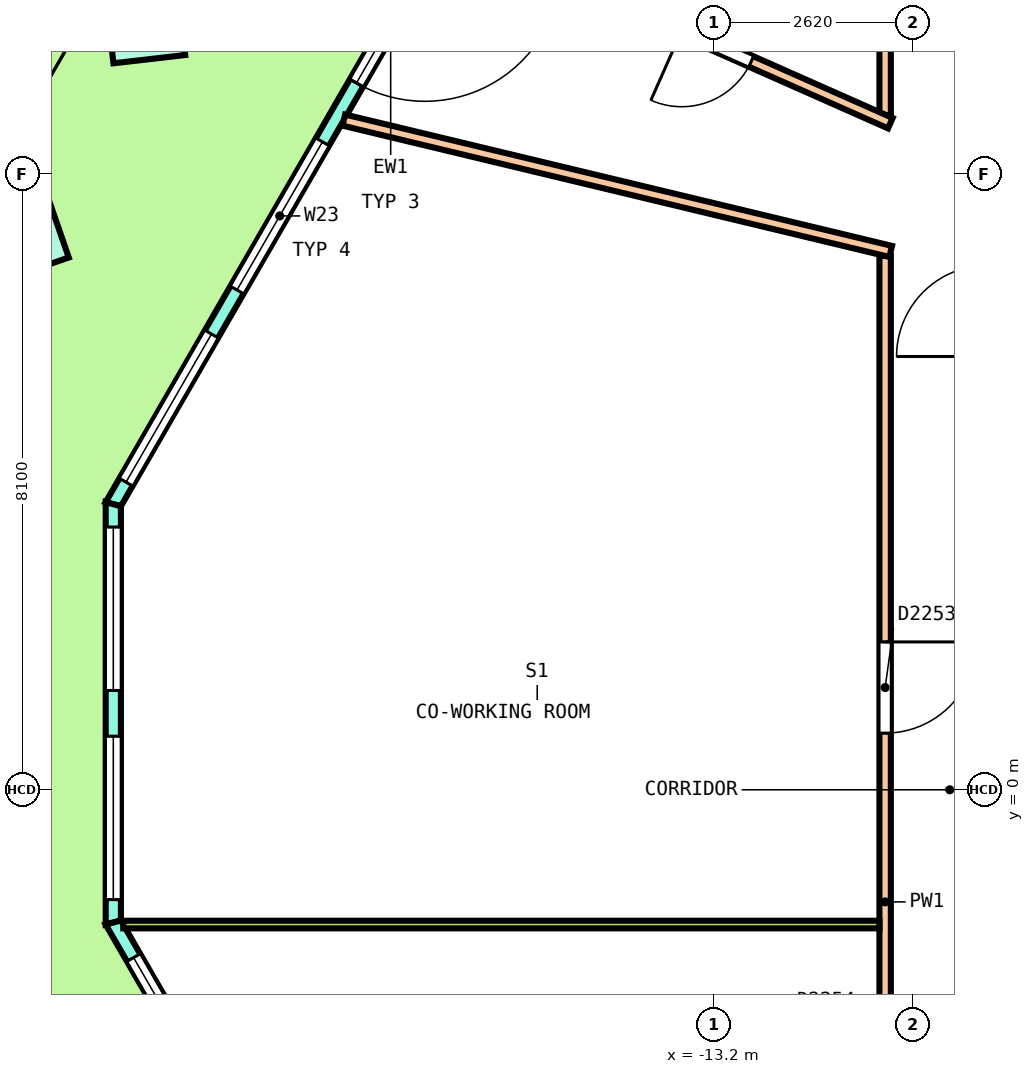
"""IFC4 building model, lengths in metres.
Left out: names, types, materials, properties, quantities, classifications, styles, units other than length and angle.
Written with IfcOpenShell. Run it as: python <this file> out.ifc"""

import sys

from ifc_helpers import new_model, si_unit, direction, frame, frame_2d, origin, origin_2d, place, context, subcontext, project, spatial, polyline, rectangle, outline, extrude, element, fill, save


model = new_model("IFC4")
c1 = context("Model", 3, precision=1e-05, world=origin(), true_north=direction((0.0, 1.0)))
c2 = subcontext(c1, "Body", "Model", "MODEL_VIEW")
j1 = project(units=[si_unit("LENGTHUNIT", "METRE"), si_unit("PLANEANGLEUNIT", "RADIAN")], contexts=[c1])
p1 = place(None, origin())
s1 = spatial("IfcSite", under=j1, at=p1, CompositionType="ELEMENT")
p2 = place(p1, origin())
s2 = spatial("IfcBuilding", under=s1, at=p2, CompositionType="ELEMENT")
p3 = place(p2, frame((0.0, 0.0, 295.0)))
s3 = spatial("IfcBuildingStorey", under=s2, at=p3, CompositionType="ELEMENT", Elevation=295.0)
p4 = place(p3, frame((-20.685, 10.084, 0.0), z_axis=(-0.025408167311, 0.018838245421, 0.999499647595), x_axis=(-0.499703712508, -0.866188822081, 0.003622734722)))
e1 = element("IfcColumn", 1, at=p4, inside=s3, PredefinedType="COLUMN", context=c2, shape_type="SweptSolid", body=[
    extrude(rectangle(XDim=0.95, YDim=0.95, at=origin_2d()), origin(), (0.0, 0.0, 1.0), 3.642),
])
p5 = place(p3, frame((-22.295, 7.296, 0.0), z_axis=(-0.021786848517, 0.025138671366, 0.999446537056), x_axis=(-0.499840745781, -0.866048897927, 0.010887389788)))
e2 = element("IfcColumn", 2, at=p5, inside=s3, PredefinedType="COLUMN", context=c2, shape_type="SweptSolid", body=[
    extrude(rectangle(XDim=0.95, YDim=0.95, at=origin_2d()), origin(), (0.0, 0.0, 1.0), 3.642),
])
p6 = place(p3, frame((-13.806, 16.398, 0.0), z_axis=(0.0, 0.0, 1.0), x_axis=(-0.500006712695, -0.866021528173, 0.0)))
e3 = element("IfcWall", 3, at=p6, inside=s3, PredefinedType="SOLIDWALL", context=c2, shape_type="SweptSolid", body=[
    extrude(outline(polyline([(-0.027, -0.1), (1.02, -0.1), (2.066, -0.1), (3.113, -0.1), (4.159, -0.1), (5.205, -0.1), (6.252, -0.1), (7.298, -0.1), (8.345, -0.1), (9.391, -0.1), (10.438, -0.1), (11.484, -0.1), (12.531, -0.1), (13.577, -0.1), (14.623, -0.1), (14.57, 0.1), (13.531, 0.1), (12.492, 0.1), (11.453, 0.1), (10.415, 0.1), (9.376, 0.1), (8.337, 0.1), (7.298, 0.1), (6.26, 0.1), (5.221, 0.1), (4.182, 0.1), (3.143, 0.1), (2.104, 0.1), (1.066, 0.1), (0.027, 0.1), (-0.027, -0.1)])), origin(), (0.0, 0.0, 1.0), 3.7),
])
p7 = place(p6, frame((0.335, 0.0, 0.1)))
e4 = element("IfcOpeningElement", 4, at=p7, cuts=e3, PredefinedType="OPENING", context=c2, shape_type="SweptSolid", body=[
    extrude(rectangle(XDim=2.25, YDim=2.75, at=frame_2d((1.125, 1.375))), frame((0.0, 0.11, 0.0), z_axis=(0.0, -1.0, 0.0), x_axis=(1.0, 0.0, 0.0)), (0.0, 0.0, 1.0), 0.22),
])
p8 = place(p6, frame((3.254, 0.0, 0.1)))
e5 = element("IfcOpeningElement", 5, at=p8, cuts=e3, PredefinedType="OPENING", context=c2, shape_type="SweptSolid", body=[
    extrude(rectangle(XDim=2.25, YDim=2.75, at=frame_2d((1.125, 1.375))), frame((0.0, 0.11, 0.0), z_axis=(0.0, -1.0, 0.0), x_axis=(1.0, 0.0, 0.0)), (0.0, 0.0, 1.0), 0.22),
])
p9 = place(p6, frame((6.398, 0.0, 0.0)))
e6 = element("IfcOpeningElement", 6, at=p9, cuts=e3, PredefinedType="OPENING", context=c2, shape_type="SweptSolid", body=[
    extrude(rectangle(XDim=1.8, YDim=2.4, at=frame_2d((0.9, 1.2))), frame((0.0, 0.11, 0.0), z_axis=(0.0, -1.0, 0.0), x_axis=(1.0, 0.0, 0.0)), (0.0, 0.0, 1.0), 0.22),
])
p10 = place(p6, frame((6.398, 0.0, 2.55)))
e7 = element("IfcOpeningElement", 7, at=p10, cuts=e3, PredefinedType="OPENING", context=c2, shape_type="SweptSolid", body=[
    extrude(rectangle(XDim=1.8, YDim=0.3, at=frame_2d((0.9, 0.15))), frame((0.0, 0.11, 0.0), z_axis=(0.0, -1.0, 0.0), x_axis=(1.0, 0.0, 0.0)), (0.0, 0.0, 1.0), 0.22),
])
p11 = place(p6, frame((9.093, 0.0, 0.1)))
e8 = element("IfcOpeningElement", 8, at=p11, cuts=e3, PredefinedType="OPENING", context=c2, shape_type="SweptSolid", body=[
    extrude(rectangle(XDim=2.25, YDim=2.75, at=frame_2d((1.125, 1.375))), frame((0.0, 0.11, 0.0), z_axis=(0.0, -1.0, 0.0), x_axis=(1.0, 0.0, 0.0)), (0.0, 0.0, 1.0), 0.22),
])
p12 = place(p6, frame((12.012, 0.0, 0.1)))
e9 = element("IfcOpeningElement", 9, at=p12, cuts=e3, PredefinedType="OPENING", context=c2, shape_type="SweptSolid", body=[
    extrude(rectangle(XDim=2.25, YDim=2.75, at=frame_2d((1.125, 1.375))), frame((0.0, 0.11, 0.0), z_axis=(0.0, -1.0, 0.0), x_axis=(1.0, 0.0, 0.0)), (0.0, 0.0, 1.0), 0.22),
])
p13 = place(p3, frame((-21.104, 3.757, 0.0), z_axis=(0.0, 0.0, 1.0), x_axis=(0.0, -1.0, 0.0)))
e10 = element("IfcWall", 10, at=p13, inside=s3, PredefinedType="SOLIDWALL", context=c2, shape_type="SweptSolid", body=[
    extrude(outline(polyline([(-0.027, -0.1), (1.084, -0.1), (2.196, -0.1), (3.307, -0.1), (4.419, -0.1), (5.53, -0.1), (5.477, 0.1), (4.387, 0.1), (3.297, 0.1), (2.207, 0.1), (1.117, 0.1), (0.027, 0.1), (-0.027, -0.1)])), origin(), (0.0, 0.0, 1.0), 3.7),
])
p14 = place(p13, frame((0.301, 0.0, 0.1)))
e11 = element("IfcOpeningElement", 11, at=p14, cuts=e10, PredefinedType="OPENING", context=c2, shape_type="SweptSolid", body=[
    extrude(rectangle(XDim=2.15, YDim=2.75, at=frame_2d((1.075, 1.375))), frame((0.0, 0.11, 0.0), z_axis=(0.0, -1.0, 0.0), x_axis=(1.0, 0.0, 0.0)), (0.0, 0.0, 1.0), 0.22),
])
p15 = place(p13, frame((3.052, 0.0, 0.1)))
e12 = element("IfcOpeningElement", 12, at=p15, cuts=e10, PredefinedType="OPENING", context=c2, shape_type="SweptSolid", body=[
    extrude(rectangle(XDim=2.15, YDim=2.75, at=frame_2d((1.075, 1.375))), frame((0.0, 0.11, 0.0), z_axis=(0.0, -1.0, 0.0), x_axis=(1.0, 0.0, 0.0)), (0.0, 0.0, 1.0), 0.22),
])
p16 = place(p3, frame((-21.104, -1.746, 0.0), z_axis=(0.0, 0.0, 1.0), x_axis=(0.500012333517, -0.866018282908, 0.0)))
e13 = element("IfcWall", 13, at=p16, inside=s3, PredefinedType="SOLIDWALL", context=c2, shape_type="SweptSolid", body=[
    extrude(outline(polyline([(-0.027, -0.1), (0.98, -0.1), (1.988, -0.1), (2.995, -0.1), (4.003, -0.1), (5.01, -0.1), (6.018, -0.1), (7.025, -0.1), (8.033, -0.1), (9.04, -0.1), (10.047, -0.1), (11.055, -0.1), (12.062, -0.1), (13.07, -0.1), (14.077, -0.1), (15.085, -0.1), (16.092, -0.1), (17.1, -0.1), (18.107, -0.1), (18.053, 0.1), (17.052, 0.1), (16.05, 0.1), (15.049, 0.1), (14.047, 0.1), (13.046, 0.1), (12.044, 0.1), (11.043, 0.1), (10.042, 0.1), (9.04, 0.1), (8.039, 0.1), (7.037, 0.1), (6.036, 0.1), (5.034, 0.1), (4.033, 0.1), (3.031, 0.1), (2.03, 0.1), (1.028, 0.1), (0.027, 0.1), (-0.027, -0.1)])), origin(), (0.0, 0.0, 1.0), 3.7),
])
p17 = place(p16, frame((0.533, 0.0, 0.1)))
e14 = element("IfcOpeningElement", 14, at=p17, cuts=e13, PredefinedType="OPENING", context=c2, shape_type="SweptSolid", body=[
    extrude(rectangle(XDim=2.55, YDim=2.75, at=frame_2d((1.275, 1.375))), frame((0.0, 0.11, 0.0), z_axis=(0.0, -1.0, 0.0), x_axis=(1.0, 0.0, 0.0)), (0.0, 0.0, 1.0), 0.22),
])
p18 = place(p16, frame((4.149, 0.0, 0.1)))
e15 = element("IfcOpeningElement", 15, at=p18, cuts=e13, PredefinedType="OPENING", context=c2, shape_type="SweptSolid", body=[
    extrude(rectangle(XDim=2.55, YDim=2.75, at=frame_2d((1.275, 1.375))), frame((0.0, 0.11, 0.0), z_axis=(0.0, -1.0, 0.0), x_axis=(1.0, 0.0, 0.0)), (0.0, 0.0, 1.0), 0.22),
])
p19 = place(p16, frame((8.14, 0.0, 0.0)))
e16 = element("IfcOpeningElement", 16, at=p19, cuts=e13, PredefinedType="OPENING", context=c2, shape_type="SweptSolid", body=[
    extrude(rectangle(XDim=1.8, YDim=2.4, at=frame_2d((0.9, 1.2))), frame((0.0, 0.11, 0.0), z_axis=(0.0, -1.0, 0.0), x_axis=(1.0, 0.0, 0.0)), (0.0, 0.0, 1.0), 0.22),
])
p20 = place(p16, frame((8.14, 0.0, 2.55)))
e17 = element("IfcOpeningElement", 17, at=p20, cuts=e13, PredefinedType="OPENING", context=c2, shape_type="SweptSolid", body=[
    extrude(rectangle(XDim=1.8, YDim=0.3, at=frame_2d((0.9, 0.15))), frame((0.0, 0.11, 0.0), z_axis=(0.0, -1.0, 0.0), x_axis=(1.0, 0.0, 0.0)), (0.0, 0.0, 1.0), 0.22),
])
p21 = place(p16, frame((11.381, 0.0, 0.1)))
e18 = element("IfcOpeningElement", 18, at=p21, cuts=e13, PredefinedType="OPENING", context=c2, shape_type="SweptSolid", body=[
    extrude(rectangle(XDim=2.55, YDim=2.75, at=frame_2d((1.275, 1.375))), frame((0.0, 0.11, 0.0), z_axis=(0.0, -1.0, 0.0), x_axis=(1.0, 0.0, 0.0)), (0.0, 0.0, 1.0), 0.22),
])
p22 = place(p16, frame((14.997, 0.0, 0.1)))
e19 = element("IfcOpeningElement", 19, at=p22, cuts=e13, PredefinedType="OPENING", context=c2, shape_type="SweptSolid", body=[
    extrude(rectangle(XDim=2.55, YDim=2.75, at=frame_2d((1.275, 1.375))), frame((0.0, 0.11, 0.0), z_axis=(0.0, -1.0, 0.0), x_axis=(1.0, 0.0, 0.0)), (0.0, 0.0, 1.0), 0.22),
])
p23 = place(p3, frame((-10.95, -9.975, 0.0), z_axis=(0.0, 0.0, 1.0), x_axis=(0.0, 1.0, 0.0)))
e20 = element("IfcWall", 20, at=p23, inside=s3, PredefinedType="PARTITIONING", context=c2, shape_type="SweptSolid", body=[
    extrude(rectangle(XDim=17.0, YDim=0.15, at=frame_2d((8.5, 0.0))), origin(), (0.0, 0.0, 1.0), 2.9),
])
p24 = place(p23, frame((10.72, 0.0, 0.0)))
e21 = element("IfcOpeningElement", 21, at=p24, cuts=e20, PredefinedType="OPENING", context=c2, shape_type="SweptSolid", body=[
    extrude(rectangle(XDim=1.2, YDim=2.1, at=frame_2d((0.6, 1.05))), frame((0.0, 0.085, 0.0), z_axis=(0.0, -1.0, 0.0), x_axis=(1.0, 0.0, 0.0)), (0.0, 0.0, 1.0), 0.17),
])
p25 = place(p23, frame((5.916, 0.0, 0.0)))
e22 = element("IfcOpeningElement", 22, at=p25, cuts=e20, PredefinedType="OPENING", context=c2, shape_type="SweptSolid", body=[
    extrude(rectangle(XDim=1.0, YDim=2.1, at=frame_2d((0.5, 1.05))), frame((0.0, 0.085, 0.0), z_axis=(0.0, -1.0, 0.0), x_axis=(1.0, 0.0, 0.0)), (0.0, 0.0, 1.0), 0.17),
])
p26 = place(p23, frame((2.379, 0.0, 0.0)))
e23 = element("IfcOpeningElement", 23, at=p26, cuts=e20, PredefinedType="OPENING", context=c2, shape_type="SweptSolid", body=[
    extrude(rectangle(XDim=1.2, YDim=2.1, at=frame_2d((0.6, 1.05))), frame((0.0, 0.085, 0.0), z_axis=(0.0, -1.0, 0.0), x_axis=(1.0, 0.0, 0.0)), (0.0, 0.0, 1.0), 0.17),
])
p27 = place(p3, frame((-10.95, 8.875, 0.0), z_axis=(0.0, 0.0, 1.0), x_axis=(0.0, 1.0, 0.0)))
e24 = element("IfcWall", 24, at=p27, inside=s3, PredefinedType="PARTITIONING", context=c2, shape_type="SweptSolid", body=[
    extrude(rectangle(XDim=1.25, YDim=0.15, at=frame_2d((0.625, 0.0))), origin(), (0.0, 0.0, 1.0), 2.9),
])
p28 = place(p3, frame((-16.625, 11.315, 0.0), z_axis=(0.0, 0.0, 1.0), x_axis=(0.914242073132, -0.405168399207, 0.0)))
e25 = element("IfcWall", 25, at=p28, inside=s3, PredefinedType="PARTITIONING", context=c2, shape_type="SweptSolid", body=[
    extrude(rectangle(XDim=6.283, YDim=0.15, at=frame_2d((3.142, 0.0))), origin(), (0.0, 0.0, 1.0), 2.9),
])
p29 = place(p28, frame((3.28, 0.0, 0.0)))
e26 = element("IfcOpeningElement", 26, at=p29, cuts=e25, PredefinedType="OPENING", context=c2, shape_type="SweptSolid", body=[
    extrude(rectangle(XDim=1.0, YDim=2.1, at=frame_2d((0.5, 1.05))), frame((0.0, 0.085, 0.0), z_axis=(0.0, -1.0, 0.0), x_axis=(1.0, 0.0, 0.0)), (0.0, 0.0, 1.0), 0.17),
])
p30 = place(p3, frame((-18.072, 8.81, 0.0), z_axis=(0.0, 0.0, 1.0), x_axis=(0.972352247426, -0.23351896481, 0.0)))
e27 = element("IfcWall", 27, at=p30, inside=s3, PredefinedType="PARTITIONING", context=c2, shape_type="SweptSolid", body=[
    extrude(rectangle(XDim=7.399, YDim=0.15, at=frame_2d((3.699, 0.0))), origin(), (0.0, 0.0, 1.0), 2.9),
])
p31 = place(p3, frame((-20.973, -1.773, 0.0), z_axis=(0.0, 0.0, 1.0), x_axis=(1.0, 0.0, 0.0)))
e28 = element("IfcWall", 28, at=p31, inside=s3, PredefinedType="PARTITIONING", context=c2, shape_type="SweptSolid", body=[
    extrude(rectangle(XDim=9.948, YDim=0.1, at=frame_2d((4.974, 0.0))), origin(), (0.0, 0.0, 1.0), 2.9),
])
p32 = place(p9, origin())
e29 = element("IfcDoor", 29, at=p32, inside=s3, OperationType="DOUBLE_DOOR_SINGLE_SWING", PredefinedType="DOOR", context=c2, shape_type="SweptSolid", body=[
    extrude(rectangle(XDim=1.8, YDim=2.4, at=frame_2d((0.9, 1.2))), frame((0.0, 0.025, 0.0), z_axis=(0.0, -1.0, 0.0), x_axis=(1.0, 0.0, 0.0)), (0.0, 0.0, 1.0), 0.05),
])
fill(e6, e29)
p33 = place(p10, origin())
e30 = element("IfcWindow", 30, at=p33, inside=s3, PartitioningType="SINGLE_PANEL", PredefinedType="WINDOW", context=c2, shape_type="SweptSolid", body=[
    extrude(rectangle(XDim=1.8, YDim=0.3, at=frame_2d((0.9, 0.15))), frame((0.0, 0.03, 0.0), z_axis=(0.0, -1.0, 0.0), x_axis=(1.0, 0.0, 0.0)), (0.0, 0.0, 1.0), 0.06),
])
fill(e7, e30)
p34 = place(p11, origin())
e31 = element("IfcWindow", 31, at=p34, inside=s3, PartitioningType="SINGLE_PANEL", PredefinedType="WINDOW", context=c2, shape_type="SweptSolid", body=[
    extrude(rectangle(XDim=2.25, YDim=2.75, at=frame_2d((1.125, 1.375))), frame((0.0, 0.03, 0.0), z_axis=(0.0, -1.0, 0.0), x_axis=(1.0, 0.0, 0.0)), (0.0, 0.0, 1.0), 0.06),
])
fill(e8, e31)
p35 = place(p12, origin())
e32 = element("IfcWindow", 32, at=p35, inside=s3, PartitioningType="SINGLE_PANEL", PredefinedType="WINDOW", context=c2, shape_type="SweptSolid", body=[
    extrude(rectangle(XDim=2.25, YDim=2.75, at=frame_2d((1.125, 1.375))), frame((0.0, 0.03, 0.0), z_axis=(0.0, -1.0, 0.0), x_axis=(1.0, 0.0, 0.0)), (0.0, 0.0, 1.0), 0.06),
])
fill(e9, e32)
p36 = place(p14, origin())
e33 = element("IfcWindow", 33, at=p36, inside=s3, PartitioningType="SINGLE_PANEL", PredefinedType="WINDOW", context=c2, shape_type="SweptSolid", body=[
    extrude(rectangle(XDim=2.15, YDim=2.75, at=frame_2d((1.075, 1.375))), frame((0.0, 0.03, 0.0), z_axis=(0.0, -1.0, 0.0), x_axis=(1.0, 0.0, 0.0)), (0.0, 0.0, 1.0), 0.06),
])
fill(e11, e33)
p37 = place(p15, origin())
e34 = element("IfcWindow", 34, at=p37, inside=s3, PartitioningType="SINGLE_PANEL", PredefinedType="WINDOW", context=c2, shape_type="SweptSolid", body=[
    extrude(rectangle(XDim=2.15, YDim=2.75, at=frame_2d((1.075, 1.375))), frame((0.0, 0.03, 0.0), z_axis=(0.0, -1.0, 0.0), x_axis=(1.0, 0.0, 0.0)), (0.0, 0.0, 1.0), 0.06),
])
fill(e12, e34)
p38 = place(p17, origin())
e35 = element("IfcWindow", 35, at=p38, inside=s3, PartitioningType="SINGLE_PANEL", PredefinedType="WINDOW", context=c2, shape_type="SweptSolid", body=[
    extrude(rectangle(XDim=2.55, YDim=2.75, at=frame_2d((1.275, 1.375))), frame((0.0, 0.03, 0.0), z_axis=(0.0, -1.0, 0.0), x_axis=(1.0, 0.0, 0.0)), (0.0, 0.0, 1.0), 0.06),
])
fill(e14, e35)
p39 = place(p29, origin())
e36 = element("IfcDoor", 36, at=p39, inside=s3, OperationType="SINGLE_SWING_LEFT", PredefinedType="DOOR", context=c2, shape_type="SweptSolid", body=[
    extrude(rectangle(XDim=1.0, YDim=2.1, at=frame_2d((0.5, 1.05))), frame((0.0, 0.025, 0.0), z_axis=(0.0, -1.0, 0.0), x_axis=(1.0, 0.0, 0.0)), (0.0, 0.0, 1.0), 0.05),
])
fill(e26, e36)
p40 = place(p24, origin())
e37 = element("IfcDoor", 37, at=p40, inside=s3, OperationType="DOUBLE_DOOR_SINGLE_SWING", PredefinedType="DOOR", context=c2, shape_type="SweptSolid", body=[
    extrude(rectangle(XDim=1.2, YDim=2.1, at=frame_2d((0.6, 1.05))), frame((0.0, 0.025, 0.0), z_axis=(0.0, -1.0, 0.0), x_axis=(1.0, 0.0, 0.0)), (0.0, 0.0, 1.0), 0.05),
])
fill(e21, e37)
save(model, sys.argv[1])
